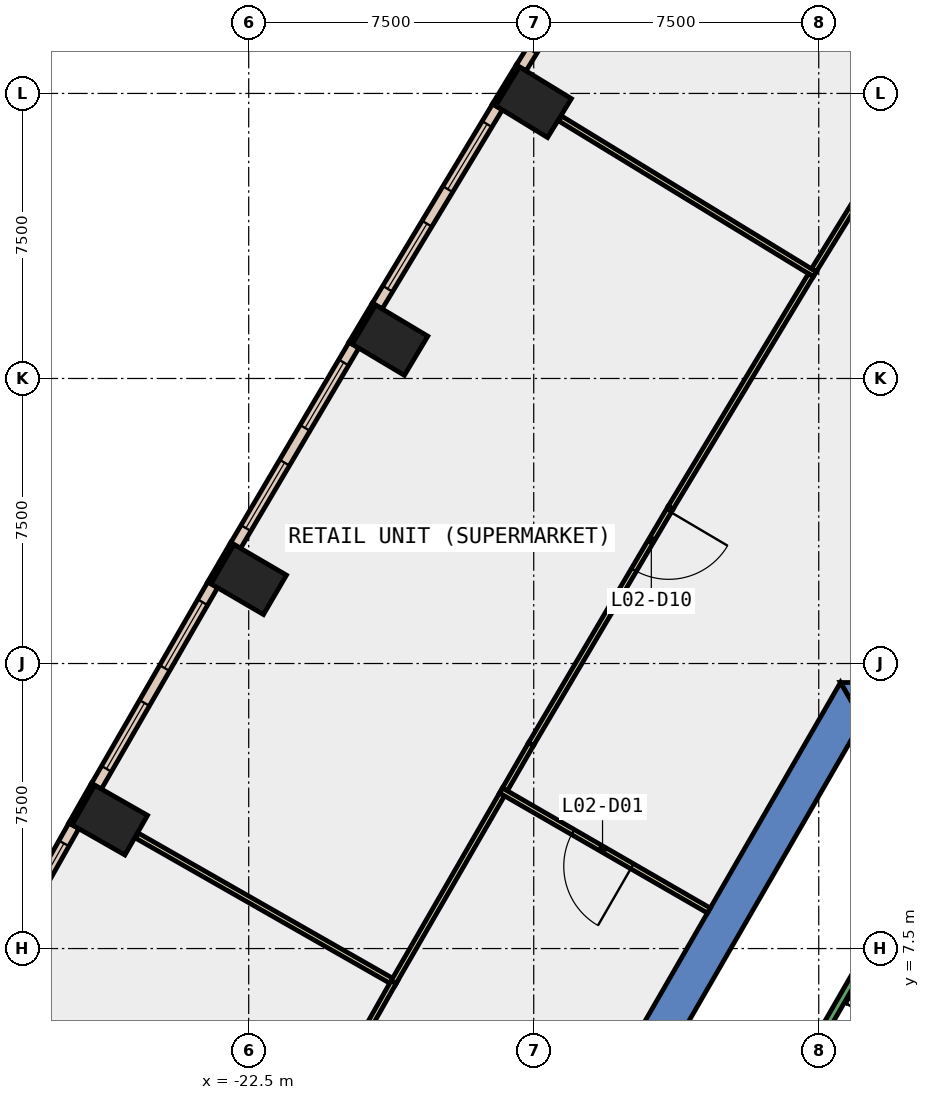
"""IFC4 building model, lengths in metres.
Left out: names, types, materials, properties, quantities, classifications, styles, units other than length and angle.
Written with IfcOpenShell. Run it as: python <this file> out.ifc"""

import sys

from ifc_helpers import new_model, si_unit, direction, frame, frame_2d, origin, origin_2d, place, context, subcontext, project, spatial, polyline, rectangle, outline, extrude, element, fill, save


model = new_model("IFC4")
c1 = context("Model", 3, precision=1e-05, world=origin(), true_north=direction((0.0, 1.0)))
c2 = subcontext(c1, "Body", "Model", "MODEL_VIEW")
j1 = project(units=[si_unit("LENGTHUNIT", "METRE"), si_unit("PLANEANGLEUNIT", "RADIAN")], contexts=[c1])
p1 = place(None, origin())
s1 = spatial("IfcSite", under=j1, at=p1, CompositionType="ELEMENT")
p2 = place(p1, origin())
s2 = spatial("IfcBuilding", under=s1, at=p2, CompositionType="ELEMENT")
p3 = place(p2, frame((0.0, 0.0, 15.0)))
s3 = spatial("IfcBuildingStorey", under=s2, at=p3, CompositionType="ELEMENT", Elevation=15.0)
for number, where, z_axis, x_axis in (
    (1, (-15.005, 29.769, -0.45), (0.0, 0.0, 1.0), (0.522, 0.853, 0.0)),
    (2, (-18.782, 23.508, -0.45), (0.0, 0.0, 1.0), (0.513, 0.858, 0.0)),
    (3, (-22.5, 17.211, -0.45), (0.0, 0.0, 1.0), (0.504, 0.864, 0.0)),
    (4, (-26.155, 10.88, -0.45), (0.0, 0.0, 1.0), (0.496, 0.869, 0.0)),
):
    element("IfcColumn", number, at=place(p3, frame(where, z_axis=z_axis, x_axis=x_axis)), inside=s3, PredefinedType="COLUMN", context=c2, shape_type="SweptSolid", body=[
        extrude(rectangle(XDim=1.2, YDim=1.6, at=origin_2d()), origin(), (0.0, 0.0, 1.0), 5.0),
    ])
p4 = place(p3, frame((0.0, 0.0, -0.45)))
e5 = element("IfcWall", 5, at=p4, inside=s3, PredefinedType="SHEAR", context=c2, shape_type="SweptSolid", body=[
    extrude(outline(polyline([(-4.55, 13.5), (-4.55, 14.5), (-6.928, 14.5), (-6.351, 13.5), (-4.55, 13.5)])), origin(), (0.0, 0.0, 1.0), 5.0),
])
p5 = place(p3, frame((0.0, 0.0, -0.45)))
e6 = element("IfcWall", 6, at=p5, inside=s3, PredefinedType="SHEAR", context=c2, shape_type="SweptSolid", body=[
    extrude(outline(polyline([(-12.267, 5.252), (-11.402, 4.752), (-6.351, 13.5), (-6.928, 14.5), (-12.267, 5.252)])), origin(), (0.0, 0.0, 1.0), 5.0),
])
p6 = place(p3, frame((-15.417, 30.724, 0.0), z_axis=(0.0, 0.0, 1.0), x_axis=(-0.521507599072, -0.853246637327, 0.0)))
e7 = element("IfcWall", 7, at=p6, inside=s3, PredefinedType="STANDARD", context=c2, shape_type="SweptSolid", body=[
    extrude(rectangle(XDim=1.2, YDim=0.1, at=frame_2d((0.6, 0.0))), origin(), (0.0, 0.0, 1.0), 4.55),
])
p7 = place(p3, frame((-19.204, 24.459, 0.0), z_axis=(0.0, 0.0, 1.0), x_axis=(-0.513238760752, -0.858245870635, 0.0)))
e8 = element("IfcWall", 8, at=p7, inside=s3, PredefinedType="STANDARD", context=c2, shape_type="SweptSolid", body=[
    extrude(rectangle(XDim=1.2, YDim=0.1, at=frame_2d((0.6, 0.0))), origin(), (0.0, 0.0, 1.0), 4.55),
])
p8 = place(p3, frame((-22.931, 18.158, 0.0), z_axis=(0.0, 0.0, 1.0), x_axis=(-0.504313844903, -0.863520437418, 0.0)))
e9 = element("IfcWall", 9, at=p8, inside=s3, PredefinedType="STANDARD", context=c2, shape_type="SweptSolid", body=[
    extrude(rectangle(XDim=1.2, YDim=0.1, at=frame_2d((0.6, 0.0))), origin(), (0.0, 0.0, 1.0), 4.55),
])
p9 = place(p3, frame((-26.596, 11.822, 0.0), z_axis=(0.0, 0.0, 1.0), x_axis=(-0.495854054996, -0.868405870629, 0.0)))
e10 = element("IfcWall", 10, at=p9, inside=s3, PredefinedType="STANDARD", context=c2, shape_type="SweptSolid", body=[
    extrude(rectangle(XDim=1.2, YDim=0.1, at=frame_2d((0.6, 0.0))), origin(), (0.0, 0.0, 1.0), 4.55),
])
p10 = place(p3, frame((-12.117, 35.881, 0.0), z_axis=(0.0, 0.0, 1.0), x_axis=(-0.524953701886, -0.85113078365, 0.0)))
e11 = element("IfcWall", 11, at=p10, inside=s3, PredefinedType="STANDARD", context=c2, shape_type="SweptSolid", body=[
    extrude(rectangle(XDim=6.123, YDim=0.3, at=frame_2d((3.061, 0.0))), origin(), (0.0, 0.0, 1.0), 4.55),
])
p11 = place(p10, frame((0.531, 0.0, 1.0)))
e12 = element("IfcOpeningElement", 12, at=p11, cuts=e11, PredefinedType="OPENING", context=c2, shape_type="SweptSolid", body=[
    extrude(rectangle(XDim=2.0, YDim=3.2, at=frame_2d((1.0, 1.6))), frame((0.0, 0.16, 0.0), z_axis=(0.0, -1.0, 0.0), x_axis=(1.0, 0.0, 0.0)), (0.0, 0.0, 1.0), 0.32),
])
p12 = place(p10, frame((3.592, 0.0, 1.0)))
e13 = element("IfcOpeningElement", 13, at=p12, cuts=e11, PredefinedType="OPENING", context=c2, shape_type="SweptSolid", body=[
    extrude(rectangle(XDim=2.0, YDim=3.2, at=frame_2d((1.0, 1.6))), frame((0.0, 0.16, 0.0), z_axis=(0.0, -1.0, 0.0), x_axis=(1.0, 0.0, 0.0)), (0.0, 0.0, 1.0), 0.32),
])
p13 = place(p3, frame((-15.954, 29.647, 0.0), z_axis=(0.0, 0.0, 1.0), x_axis=(-0.516687651362, -0.85617397235, 0.0)))
e14 = element("IfcWall", 14, at=p13, inside=s3, PredefinedType="STANDARD", context=c2, shape_type="SweptSolid", body=[
    extrude(rectangle(XDim=6.121, YDim=0.3, at=frame_2d((3.061, 0.0))), origin(), (0.0, 0.0, 1.0), 4.55),
])
p14 = place(p13, frame((0.53, 0.0, 1.0)))
e15 = element("IfcOpeningElement", 15, at=p14, cuts=e14, PredefinedType="OPENING", context=c2, shape_type="SweptSolid", body=[
    extrude(rectangle(XDim=2.0, YDim=3.2, at=frame_2d((1.0, 1.6))), frame((0.0, 0.16, 0.0), z_axis=(0.0, -1.0, 0.0), x_axis=(1.0, 0.0, 0.0)), (0.0, 0.0, 1.0), 0.32),
])
p15 = place(p13, frame((3.591, 0.0, 1.0)))
e16 = element("IfcOpeningElement", 16, at=p15, cuts=e14, PredefinedType="OPENING", context=c2, shape_type="SweptSolid", body=[
    extrude(rectangle(XDim=2.0, YDim=3.2, at=frame_2d((1.0, 1.6))), frame((0.0, 0.16, 0.0), z_axis=(0.0, -1.0, 0.0), x_axis=(1.0, 0.0, 0.0)), (0.0, 0.0, 1.0), 0.32),
])
p16 = place(p3, frame((-19.731, 23.377, 0.0), z_axis=(0.0, 0.0, 1.0), x_axis=(-0.50834231483, -0.861155091115, 0.0)))
e17 = element("IfcWall", 17, at=p16, inside=s3, PredefinedType="STANDARD", context=c2, shape_type="SweptSolid", body=[
    extrude(rectangle(XDim=6.122, YDim=0.3, at=frame_2d((3.061, 0.0))), origin(), (0.0, 0.0, 1.0), 4.55),
])
p17 = place(p16, frame((0.53, 0.0, 1.0)))
e18 = element("IfcOpeningElement", 18, at=p17, cuts=e17, PredefinedType="OPENING", context=c2, shape_type="SweptSolid", body=[
    extrude(rectangle(XDim=2.0, YDim=3.2, at=frame_2d((1.0, 1.6))), frame((0.0, 0.16, 0.0), z_axis=(0.0, -1.0, 0.0), x_axis=(1.0, 0.0, 0.0)), (0.0, 0.0, 1.0), 0.32),
])
p18 = place(p16, frame((3.591, 0.0, 1.0)))
e19 = element("IfcOpeningElement", 19, at=p18, cuts=e17, PredefinedType="OPENING", context=c2, shape_type="SweptSolid", body=[
    extrude(rectangle(XDim=2.0, YDim=3.2, at=frame_2d((1.0, 1.6))), frame((0.0, 0.16, 0.0), z_axis=(0.0, -1.0, 0.0), x_axis=(1.0, 0.0, 0.0)), (0.0, 0.0, 1.0), 0.32),
])
p19 = place(p3, frame((-23.447, 17.071, 0.0), z_axis=(0.0, 0.0, 1.0), x_axis=(-0.499939977436, -0.866060055055, 0.0)))
e20 = element("IfcWall", 20, at=p19, inside=s3, PredefinedType="STANDARD", context=c2, shape_type="SweptSolid", body=[
    extrude(rectangle(XDim=6.121, YDim=0.3, at=frame_2d((3.061, 0.0))), origin(), (0.0, 0.0, 1.0), 4.55),
])
p20 = place(p19, frame((0.53, 0.0, 1.0)))
e21 = element("IfcOpeningElement", 21, at=p20, cuts=e20, PredefinedType="OPENING", context=c2, shape_type="SweptSolid", body=[
    extrude(rectangle(XDim=2.0, YDim=3.2, at=frame_2d((1.0, 1.6))), frame((0.0, 0.16, 0.0), z_axis=(0.0, -1.0, 0.0), x_axis=(1.0, 0.0, 0.0)), (0.0, 0.0, 1.0), 0.32),
])
p21 = place(p19, frame((3.591, 0.0, 1.0)))
e22 = element("IfcOpeningElement", 22, at=p21, cuts=e20, PredefinedType="OPENING", context=c2, shape_type="SweptSolid", body=[
    extrude(rectangle(XDim=2.0, YDim=3.2, at=frame_2d((1.0, 1.6))), frame((0.0, 0.16, 0.0), z_axis=(0.0, -1.0, 0.0), x_axis=(1.0, 0.0, 0.0)), (0.0, 0.0, 1.0), 0.32),
])
p22 = place(p3, frame((-27.101, 10.73, 0.0), z_axis=(0.0, 0.0, 1.0), x_axis=(-0.491661677717, -0.870786308267, 0.0)))
e23 = element("IfcWall", 23, at=p22, inside=s3, PredefinedType="STANDARD", context=c2, shape_type="SweptSolid", body=[
    extrude(rectangle(XDim=6.122, YDim=0.3, at=frame_2d((3.061, 0.0))), origin(), (0.0, 0.0, 1.0), 4.55),
])
p23 = place(p22, frame((0.531, 0.0, 1.0)))
e24 = element("IfcOpeningElement", 24, at=p23, cuts=e23, PredefinedType="OPENING", context=c2, shape_type="SweptSolid", body=[
    extrude(rectangle(XDim=2.0, YDim=3.2, at=frame_2d((1.0, 1.6))), frame((0.0, 0.16, 0.0), z_axis=(0.0, -1.0, 0.0), x_axis=(1.0, 0.0, 0.0)), (0.0, 0.0, 1.0), 0.32),
])
p24 = place(p22, frame((3.592, 0.0, 1.0)))
e25 = element("IfcOpeningElement", 25, at=p24, cuts=e23, PredefinedType="OPENING", context=c2, shape_type="SweptSolid", body=[
    extrude(rectangle(XDim=2.0, YDim=3.2, at=frame_2d((1.0, 1.6))), frame((0.0, 0.16, 0.0), z_axis=(0.0, -1.0, 0.0), x_axis=(1.0, 0.0, 0.0)), (0.0, 0.0, 1.0), 0.32),
])
p25 = place(p3, frame((-7.604, 25.244, 0.0), z_axis=(0.0, 0.0, 1.0), x_axis=(-0.853159640052, 0.521649909985, 0.0)))
e26 = element("IfcWall", 26, at=p25, inside=s3, PredefinedType="PARTITIONING", context=c2, shape_type="SweptSolid", body=[
    extrude(rectangle(XDim=7.854, YDim=0.15, at=frame_2d((3.927, 0.0))), origin(), (0.0, 0.0, 1.0), 4.55),
])
p26 = place(p3, frame((-3.868, 31.444, 0.0), z_axis=(0.0, 0.0, 1.0), x_axis=(-0.525005307826, -0.851098952387, 0.0)))
e27 = element("IfcWall", 27, at=p26, inside=s3, PredefinedType="PARTITIONING", context=c2, shape_type="SweptSolid", body=[
    extrude(rectangle(XDim=7.154, YDim=0.15, at=frame_2d((3.577, 0.0))), origin(), (0.0, 0.0, 1.0), 4.55),
])
p27 = place(p26, frame((1.096, 0.0, 0.0)))
e28 = element("IfcOpeningElement", 28, at=p27, cuts=e27, PredefinedType="OPENING", context=c2, shape_type="SweptSolid", body=[
    extrude(rectangle(XDim=1.8, YDim=2.1, at=frame_2d((0.9, 1.05))), frame((0.0, 0.085, 0.0), z_axis=(0.0, -1.0, 0.0), x_axis=(1.0, 0.0, 0.0)), (0.0, 0.0, 1.0), 0.17),
])
p28 = place(p3, frame((-18.621, 6.58, 0.0), z_axis=(0.0, 0.0, 1.0), x_axis=(-0.86854328957, 0.495613311104, 0.0)))
e29 = element("IfcWall", 29, at=p28, inside=s3, PredefinedType="PARTITIONING", context=c2, shape_type="SweptSolid", body=[
    extrude(rectangle(XDim=7.854, YDim=0.15, at=frame_2d((3.927, 0.0))), origin(), (0.0, 0.0, 1.0), 4.55),
])
p29 = place(p3, frame((-7.707, 25.219, 0.0), z_axis=(0.0, 0.0, 1.0), x_axis=(-0.516469307375, -0.856305701569, 0.0)))
e30 = element("IfcWall", 30, at=p29, inside=s3, PredefinedType="PARTITIONING", context=c2, shape_type="SweptSolid", body=[
    extrude(rectangle(XDim=7.145, YDim=0.15, at=frame_2d((3.572, 0.0))), origin(), (0.0, 0.0, 1.0), 4.55),
])
p30 = place(p3, frame((-11.397, 19.101, 0.0), z_axis=(0.0, 0.0, 1.0), x_axis=(-0.508419849244, -0.861109317621, 0.0)))
e31 = element("IfcWall", 31, at=p30, inside=s3, PredefinedType="PARTITIONING", context=c2, shape_type="SweptSolid", body=[
    extrude(rectangle(XDim=7.23, YDim=0.15, at=frame_2d((3.615, 0.0))), origin(), (0.0, 0.0, 1.0), 4.55),
])
p31 = place(p30, frame((0.1, 0.0, 0.0)))
e32 = element("IfcOpeningElement", 32, at=p31, cuts=e31, PredefinedType="OPENING", context=c2, shape_type="SweptSolid", body=[
    extrude(rectangle(XDim=1.8, YDim=2.1, at=frame_2d((0.9, 1.05))), frame((0.0, 0.085, 0.0), z_axis=(0.0, -1.0, 0.0), x_axis=(1.0, 0.0, 0.0)), (0.0, 0.0, 1.0), 0.17),
])
p32 = place(p3, frame((-15.073, 12.875, 0.0), z_axis=(0.0, 0.0, 1.0), x_axis=(-0.499773776046, -0.866155974855, 0.0)))
e33 = element("IfcWall", 33, at=p32, inside=s3, PredefinedType="PARTITIONING", context=c2, shape_type="SweptSolid", body=[
    extrude(rectangle(XDim=1.373, YDim=0.15, at=frame_2d((0.687, 0.0))), origin(), (0.0, 0.0, 1.0), 4.55),
])
p33 = place(p3, frame((-15.834, 11.556, 0.0), z_axis=(0.0, 0.0, 1.0), x_axis=(-0.500070759958, -0.865984546649, 0.0)))
e34 = element("IfcWall", 34, at=p33, inside=s3, PredefinedType="PARTITIONING", context=c2, shape_type="SweptSolid", body=[
    extrude(rectangle(XDim=5.703, YDim=0.15, at=frame_2d((2.852, 0.0))), origin(), (0.0, 0.0, 1.0), 4.55),
])
p34 = place(p3, frame((-18.687, 6.616, 0.0), z_axis=(0.0, 0.0, 1.0), x_axis=(-0.491575368277, -0.870835034494, 0.0)))
e35 = element("IfcWall", 35, at=p34, inside=s3, PredefinedType="PARTITIONING", context=c2, shape_type="SweptSolid", body=[
    extrude(rectangle(XDim=7.23, YDim=0.15, at=frame_2d((3.615, 0.0))), origin(), (0.0, 0.0, 1.0), 4.55),
])
p35 = place(p3, frame((-10.392, 8.5, 0.0), z_axis=(0.0, 0.0, 1.0), x_axis=(-0.865967369837, 0.500100504277, 0.0)))
e36 = element("IfcWall", 36, at=p35, inside=s3, PredefinedType="PARTITIONING", context=c2, shape_type="SweptSolid", body=[
    extrude(rectangle(XDim=6.317, YDim=0.15, at=frame_2d((3.158, 0.0))), origin(), (0.0, 0.0, 1.0), 4.55),
])
p36 = place(p35, frame((2.33, 0.0, 0.0)))
e37 = element("IfcOpeningElement", 37, at=p36, cuts=e36, PredefinedType="OPENING", context=c2, shape_type="SweptSolid", body=[
    extrude(rectangle(XDim=1.8, YDim=2.1, at=frame_2d((0.9, 1.05))), frame((0.0, 0.085, 0.0), z_axis=(0.0, -1.0, 0.0), x_axis=(1.0, 0.0, 0.0)), (0.0, 0.0, 1.0), 0.17),
])
p37 = place(p3, frame((-5.03, 9.388, 0.0), z_axis=(0.0, 0.0, 1.0), x_axis=(-0.499978703459, -0.866037698999, 0.0)))
e38 = element("IfcWall", 38, at=p37, inside=s3, PredefinedType="STANDARD", context=c2, shape_type="SweptSolid", body=[
    extrude(rectangle(XDim=6.9, YDim=0.2, at=frame_2d((3.45, 0.0))), origin(), (0.0, 0.0, 1.0), 4.55),
])
p38 = place(p14, origin())
e39 = element("IfcWindow", 39, at=p38, inside=s3, PartitioningType="SINGLE_PANEL", PredefinedType="WINDOW", context=c2, shape_type="SweptSolid", body=[
    extrude(rectangle(XDim=2.0, YDim=3.2, at=frame_2d((1.0, 1.6))), frame((0.0, 0.03, 0.0), z_axis=(0.0, -1.0, 0.0), x_axis=(1.0, 0.0, 0.0)), (0.0, 0.0, 1.0), 0.06),
])
fill(e15, e39)
p39 = place(p15, origin())
e40 = element("IfcWindow", 40, at=p39, inside=s3, PartitioningType="SINGLE_PANEL", PredefinedType="WINDOW", context=c2, shape_type="SweptSolid", body=[
    extrude(rectangle(XDim=2.0, YDim=3.2, at=frame_2d((1.0, 1.6))), frame((0.0, 0.03, 0.0), z_axis=(0.0, -1.0, 0.0), x_axis=(1.0, 0.0, 0.0)), (0.0, 0.0, 1.0), 0.06),
])
fill(e16, e40)
p40 = place(p17, origin())
e41 = element("IfcWindow", 41, at=p40, inside=s3, PartitioningType="SINGLE_PANEL", PredefinedType="WINDOW", context=c2, shape_type="SweptSolid", body=[
    extrude(rectangle(XDim=2.0, YDim=3.2, at=frame_2d((1.0, 1.6))), frame((0.0, 0.03, 0.0), z_axis=(0.0, -1.0, 0.0), x_axis=(1.0, 0.0, 0.0)), (0.0, 0.0, 1.0), 0.06),
])
fill(e18, e41)
p41 = place(p18, origin())
e42 = element("IfcWindow", 42, at=p41, inside=s3, PartitioningType="SINGLE_PANEL", PredefinedType="WINDOW", context=c2, shape_type="SweptSolid", body=[
    extrude(rectangle(XDim=2.0, YDim=3.2, at=frame_2d((1.0, 1.6))), frame((0.0, 0.03, 0.0), z_axis=(0.0, -1.0, 0.0), x_axis=(1.0, 0.0, 0.0)), (0.0, 0.0, 1.0), 0.06),
])
fill(e19, e42)
p42 = place(p20, origin())
e43 = element("IfcWindow", 43, at=p42, inside=s3, PartitioningType="SINGLE_PANEL", PredefinedType="WINDOW", context=c2, shape_type="SweptSolid", body=[
    extrude(rectangle(XDim=2.0, YDim=3.2, at=frame_2d((1.0, 1.6))), frame((0.0, 0.03, 0.0), z_axis=(0.0, -1.0, 0.0), x_axis=(1.0, 0.0, 0.0)), (0.0, 0.0, 1.0), 0.06),
])
fill(e21, e43)
p43 = place(p21, origin())
e44 = element("IfcWindow", 44, at=p43, inside=s3, PartitioningType="SINGLE_PANEL", PredefinedType="WINDOW", context=c2, shape_type="SweptSolid", body=[
    extrude(rectangle(XDim=2.0, YDim=3.2, at=frame_2d((1.0, 1.6))), frame((0.0, 0.03, 0.0), z_axis=(0.0, -1.0, 0.0), x_axis=(1.0, 0.0, 0.0)), (0.0, 0.0, 1.0), 0.06),
])
fill(e22, e44)
p44 = place(p23, origin())
e45 = element("IfcWindow", 45, at=p44, inside=s3, PartitioningType="SINGLE_PANEL", PredefinedType="WINDOW", context=c2, shape_type="SweptSolid", body=[
    extrude(rectangle(XDim=2.0, YDim=3.2, at=frame_2d((1.0, 1.6))), frame((0.0, 0.03, 0.0), z_axis=(0.0, -1.0, 0.0), x_axis=(1.0, 0.0, 0.0)), (0.0, 0.0, 1.0), 0.06),
])
fill(e24, e45)
p45 = place(p36, origin())
e46 = element("IfcDoor", 46, at=p45, inside=s3, OperationType="DOUBLE_DOOR_SINGLE_SWING", PredefinedType="DOOR", context=c2, shape_type="SweptSolid", body=[
    extrude(rectangle(XDim=1.8, YDim=2.1, at=frame_2d((0.9, 1.05))), frame((0.0, 0.025, 0.0), z_axis=(0.0, -1.0, 0.0), x_axis=(1.0, 0.0, 0.0)), (0.0, 0.0, 1.0), 0.05),
])
fill(e37, e46)
p46 = place(p31, origin())
e47 = element("IfcDoor", 47, at=p46, inside=s3, OperationType="DOUBLE_DOOR_SINGLE_SWING", PredefinedType="DOOR", context=c2, shape_type="SweptSolid", body=[
    extrude(rectangle(XDim=1.8, YDim=2.1, at=frame_2d((0.9, 1.05))), frame((0.0, 0.025, 0.0), z_axis=(0.0, -1.0, 0.0), x_axis=(1.0, 0.0, 0.0)), (0.0, 0.0, 1.0), 0.05),
])
fill(e32, e47)
save(model, sys.argv[1])
